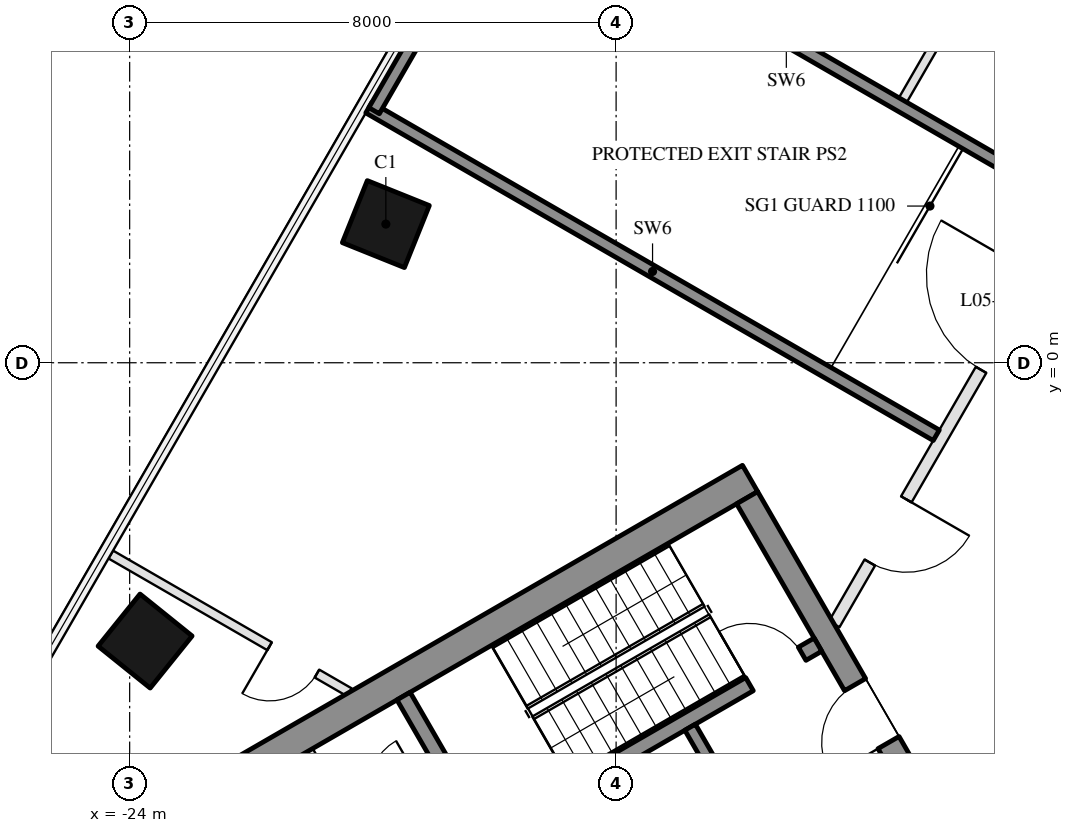
"""IFC4 building model, lengths in metres.
Left out: names, types, materials, properties, quantities, classifications, styles, units other than length and angle.
Written with IfcOpenShell. Run it as: python <this file> out.ifc"""

import sys

from ifc_helpers import new_model, si_unit, direction, frame, frame_2d, origin, origin_2d, place, context, subcontext, project, spatial, rectangle, hollow_rectangle, extrude, boolean, halfspace, element, fill, save


model = new_model("IFC4")
c1 = context("Model", 3, precision=1e-05, world=origin(), true_north=direction((0.0, 1.0)))
c2 = subcontext(c1, "Body", "Model", "MODEL_VIEW")
j1 = project(units=[si_unit("LENGTHUNIT", "METRE"), si_unit("PLANEANGLEUNIT", "RADIAN")], contexts=[c1])
p1 = place(None, origin())
s1 = spatial("IfcSite", under=j1, at=p1, CompositionType="ELEMENT")
p2 = place(p1, origin())
s2 = spatial("IfcBuilding", under=s1, at=p2, CompositionType="ELEMENT")
p3 = place(p2, frame((0.0, 0.0, 33.0)))
s3 = spatial("IfcBuildingStorey", under=s2, at=p3, CompositionType="ELEMENT", Elevation=33.0)
p4 = place(p3, frame((-19.787, 2.281, 0.0), z_axis=(0.010958529764, -0.001573254273, 0.99993871587), x_axis=(-0.501077464826, -0.865392580649, 0.004129842831)))
e1 = element("IfcColumn", 1, at=p4, inside=s3, PredefinedType="COLUMN", context=c2, shape_type="SweptSolid", body=[
    boolean("DIFFERENCE", boolean("DIFFERENCE", extrude(hollow_rectangle(XDim=1.1, YDim=1.1, WallThickness=0.05, at=origin_2d()), origin(), (0.0, 0.0, 1.0), 4.5), halfspace(frame((0.0, 0.0, 0.01), z_axis=(0.0, 0.0, 1.0), x_axis=(1.0, 0.0, 0.0)), True)), halfspace(frame((0.0, 0.0, 4.494), z_axis=(0.0, 0.0, 1.0), x_axis=(1.0, 0.0, 0.0)), False)),
])
p5 = place(p3, frame((-23.746, -4.577, 0.0), z_axis=(0.01301970202, 0.00206145282, 0.999913115111), x_axis=(-0.497599356322, -0.867367587298, 0.008267351011)))
e2 = element("IfcColumn", 2, at=p5, inside=s3, PredefinedType="COLUMN", context=c2, shape_type="SweptSolid", body=[
    boolean("DIFFERENCE", boolean("DIFFERENCE", extrude(hollow_rectangle(XDim=1.1, YDim=1.1, WallThickness=0.05, at=origin_2d()), origin(), (0.0, 0.0, 1.0), 4.5), halfspace(frame((0.0, 0.0, 0.012), z_axis=(0.0, 0.0, 1.0), x_axis=(1.0, 0.0, 0.0)), True)), halfspace(frame((0.0, 0.0, 4.493), z_axis=(0.0, 0.0, 1.0), x_axis=(1.0, 0.0, 0.0)), False)),
])
p6 = place(p3, frame((-13.797, -1.903, 0.0), z_axis=(0.0, 0.0, 1.0), x_axis=(-0.866025798973, -0.499999315512, 0.0)))
e3 = element("IfcWall", 3, at=p6, inside=s3, PredefinedType="SHEAR", context=c2, shape_type="SweptSolid", body=[
    extrude(rectangle(XDim=14.91, YDim=0.5, at=frame_2d((7.455, 0.0))), origin(), (0.0, 0.0, 1.0), 4.2),
])
p7 = place(p3, frame((-13.845, -2.22, 0.0), z_axis=(0.0, 0.0, 1.0), x_axis=(0.500004234368, -0.866022959057, 0.0)))
e4 = element("IfcWall", 4, at=p7, inside=s3, PredefinedType="SHEAR", context=c2, shape_type="SweptSolid", body=[
    extrude(rectangle(XDim=10.0, YDim=0.4, at=frame_2d((5.0, 0.0))), origin(), (0.0, 0.0, 1.0), 4.2),
])
p8 = place(p7, frame((3.55, 0.0, 0.0)))
e5 = element("IfcOpeningElement", 5, at=p8, cuts=e4, PredefinedType="OPENING", context=c2, shape_type="SweptSolid", body=[
    extrude(rectangle(XDim=1.1, YDim=2.1, at=frame_2d((0.55, 1.05))), frame((0.0, 0.21, 0.0), z_axis=(0.0, -1.0, 0.0), x_axis=(1.0, 0.0, 0.0)), (0.0, 0.0, 1.0), 0.42),
])
p9 = place(p7, frame((5.85, 0.0, 0.0)))
e6 = element("IfcOpeningElement", 6, at=p9, cuts=e4, PredefinedType="OPENING", context=c2, shape_type="SweptSolid", body=[
    extrude(rectangle(XDim=1.4, YDim=2.1, at=frame_2d((0.7, 1.05))), frame((0.0, 0.21, 0.0), z_axis=(0.0, -1.0, 0.0), x_axis=(1.0, 0.0, 0.0)), (0.0, 0.0, 1.0), 0.42),
])
p10 = place(p3, frame((-12.681, -4.636, 0.0), z_axis=(0.0, 0.0, 1.0), x_axis=(-0.866021702275, -0.500006411147, 0.0)))
e7 = element("IfcWall", 7, at=p10, inside=s3, PredefinedType="SHEAR", context=c2, shape_type="SweptSolid", body=[
    extrude(rectangle(XDim=6.45, YDim=0.25, at=frame_2d((3.225, 0.0))), origin(), (0.0, 0.0, 1.0), 4.2),
])
p11 = place(p10, frame((0.3, 0.0, 0.0)))
e8 = element("IfcOpeningElement", 8, at=p11, cuts=e7, PredefinedType="OPENING", context=c2, shape_type="SweptSolid", body=[
    extrude(rectangle(XDim=1.0, YDim=2.1, at=frame_2d((0.5, 1.05))), frame((0.0, 0.135, 0.0), z_axis=(0.0, -1.0, 0.0), x_axis=(1.0, 0.0, 0.0)), (0.0, 0.0, 1.0), 0.27),
])
p12 = place(p3, frame((-19.496, -5.482, 0.0), z_axis=(0.0, 0.0, 1.0), x_axis=(0.499990435942, -0.866030925526, 0.0)))
e9 = element("IfcWall", 9, at=p12, inside=s3, PredefinedType="SHEAR", context=c2, shape_type="SweptSolid", body=[
    extrude(rectangle(XDim=2.55, YDim=0.25, at=frame_2d((1.275, 0.0))), origin(), (0.0, 0.0, 1.0), 4.2),
])
p13 = place(p3, frame((-14.783, -5.995, 0.0), z_axis=(0.0, 0.0, 1.0), x_axis=(0.49994636267, -0.866056369097, 0.0)))
e10 = element("IfcWall", 10, at=p13, inside=s3, PredefinedType="SHEAR", context=c2, shape_type="SweptSolid", body=[
    extrude(rectangle(XDim=2.8, YDim=0.2, at=frame_2d((1.4, 0.0))), origin(), (0.0, 0.0, 1.0), 4.2),
])
p14 = place(p13, frame((0.7, 0.0, 0.0)))
e11 = element("IfcOpeningElement", 11, at=p14, cuts=e10, PredefinedType="OPENING", context=c2, shape_type="SweptSolid", body=[
    extrude(rectangle(XDim=1.2, YDim=2.1, at=frame_2d((0.6, 1.05))), frame((0.0, 0.11, 0.0), z_axis=(0.0, -1.0, 0.0), x_axis=(1.0, 0.0, 0.0)), (0.0, 0.0, 1.0), 0.22),
])
p15 = place(p3, frame((-21.076, -6.395, 0.0), z_axis=(0.0, 0.0, 1.0), x_axis=(0.50001468107, -0.866016927499, 0.0)))
e12 = element("IfcWall", 12, at=p15, inside=s3, PredefinedType="PARTITIONING", context=c2, shape_type="SweptSolid", body=[
    extrude(rectangle(XDim=5.4, YDim=0.2, at=frame_2d((2.7, 0.0))), origin(), (0.0, 0.0, 1.0), 4.2),
])
p16 = place(p15, frame((3.05, 0.0, 0.0)))
e13 = element("IfcOpeningElement", 13, at=p16, cuts=e12, PredefinedType="OPENING", context=c2, shape_type="SweptSolid", body=[
    extrude(rectangle(XDim=0.9, YDim=2.1, at=frame_2d((0.45, 1.05))), frame((0.0, 0.11, 0.0), z_axis=(0.0, -1.0, 0.0), x_axis=(1.0, 0.0, 0.0)), (0.0, 0.0, 1.0), 0.22),
])
p17 = place(p3, frame((-7.122, 11.531, 0.0), z_axis=(0.0, 0.0, 1.0), x_axis=(-0.500018619731, -0.866014653411, 0.0)))
e14 = element("IfcWall", 14, at=p17, inside=s3, PredefinedType="PARTITIONING", context=c2, shape_type="SweptSolid", body=[
    extrude(rectangle(XDim=8.325, YDim=0.15, at=frame_2d((4.163, 0.0))), origin(), (0.0, 0.0, 1.0), 3.41),
])
p18 = place(p17, frame((6.354, 0.0, 0.0)))
e15 = element("IfcOpeningElement", 15, at=p18, cuts=e14, PredefinedType="OPENING", context=c2, shape_type="SweptSolid", body=[
    extrude(rectangle(XDim=1.0, YDim=2.1, at=frame_2d((0.5, 1.05))), frame((0.0, 0.085, 0.0), z_axis=(0.0, -1.0, 0.0), x_axis=(1.0, 0.0, 0.0)), (0.0, 0.0, 1.0), 0.17),
])
p19 = place(p17, frame((3.562, 0.0, 0.0)))
e16 = element("IfcOpeningElement", 16, at=p19, cuts=e14, PredefinedType="OPENING", context=c2, shape_type="SweptSolid", body=[
    extrude(rectangle(XDim=0.9, YDim=2.1, at=frame_2d((0.45, 1.05))), frame((0.0, 0.085, 0.0), z_axis=(0.0, -1.0, 0.0), x_axis=(1.0, 0.0, 0.0)), (0.0, 0.0, 1.0), 0.17),
])
p20 = place(p17, frame((0.871, 0.0, 0.0)))
e17 = element("IfcOpeningElement", 17, at=p20, cuts=e14, PredefinedType="OPENING", context=c2, shape_type="SweptSolid", body=[
    extrude(rectangle(XDim=0.9, YDim=2.1, at=frame_2d((0.45, 1.05))), frame((0.0, 0.085, 0.0), z_axis=(0.0, -1.0, 0.0), x_axis=(1.0, 0.0, 0.0)), (0.0, 0.0, 1.0), 0.17),
])
p21 = place(p3, frame((-17.867, 8.006, 0.0), z_axis=(0.0, 0.0, 1.0), x_axis=(0.866017693218, -0.500013354855, 0.0)))
e18 = element("IfcWall", 18, at=p21, inside=s3, PredefinedType="SOLIDWALL", context=c2, shape_type="SweptSolid", body=[
    extrude(rectangle(XDim=10.776, YDim=0.2, at=frame_2d((5.388, 0.0))), origin(), (0.0, 0.0, 1.0), 4.2),
])
p22 = place(p3, frame((-20.067, 4.196, 0.0), z_axis=(0.0, 0.0, 1.0), x_axis=(0.866023357302, -0.500003544594, 0.0)))
e19 = element("IfcWall", 19, at=p22, inside=s3, PredefinedType="SOLIDWALL", context=c2, shape_type="SweptSolid", body=[
    extrude(rectangle(XDim=10.776, YDim=0.2, at=frame_2d((5.388, 0.0))), origin(), (0.0, 0.0, 1.0), 4.2),
])
p23 = place(p3, frame((-24.31, -3.155, 0.0), z_axis=(0.0, 0.0, 1.0), x_axis=(0.866025843094, -0.499999239093, 0.0)))
e20 = element("IfcWall", 20, at=p23, inside=s3, PredefinedType="PARTITIONING", context=c2, shape_type="SweptSolid", body=[
    extrude(rectangle(XDim=4.53, YDim=0.15, at=frame_2d((2.265, 0.0))), origin(), (0.0, 0.0, 1.0), 4.2),
])
p24 = place(p23, frame((3.015, 0.0, 0.0)))
e21 = element("IfcOpeningElement", 21, at=p24, cuts=e20, PredefinedType="OPENING", context=c2, shape_type="SweptSolid", body=[
    extrude(rectangle(XDim=0.9, YDim=2.1, at=frame_2d((0.45, 1.05))), frame((0.0, 0.085, 0.0), z_axis=(0.0, -1.0, 0.0), x_axis=(1.0, 0.0, 0.0)), (0.0, 0.0, 1.0), 0.17),
])
p25 = place(p3, frame((-2.482, 12.9, 0.0), z_axis=(0.0, 0.0, 1.0), x_axis=(-0.50000478328, -0.866022642139, 0.0)))
e22 = element("IfcWall", 22, at=p25, inside=s3, PredefinedType="PARTITIONING", context=c2, shape_type="SweptSolid", body=[
    extrude(rectangle(XDim=19.861, YDim=0.2, at=frame_2d((9.931, 0.0))), origin(), (0.0, 0.0, 1.0), 3.41),
])
p26 = place(p25, frame((13.23, 0.0, 0.0)))
e23 = element("IfcOpeningElement", 23, at=p26, cuts=e22, PredefinedType="OPENING", context=c2, shape_type="SweptSolid", body=[
    extrude(rectangle(XDim=1.8, YDim=2.1, at=frame_2d((0.9, 1.05))), frame((0.0, 0.11, 0.0), z_axis=(0.0, -1.0, 0.0), x_axis=(1.0, 0.0, 0.0)), (0.0, 0.0, 1.0), 0.22),
])
p27 = place(p25, frame((0.667, 0.0, 0.0)))
e24 = element("IfcOpeningElement", 24, at=p27, cuts=e22, PredefinedType="OPENING", context=c2, shape_type="SweptSolid", body=[
    extrude(rectangle(XDim=1.0, YDim=2.1, at=frame_2d((0.5, 1.05))), frame((0.0, 0.11, 0.0), z_axis=(0.0, -1.0, 0.0), x_axis=(1.0, 0.0, 0.0)), (0.0, 0.0, 1.0), 0.22),
])
p28 = place(p25, frame((2.1, 0.0, 0.0)))
e25 = element("IfcOpeningElement", 25, at=p28, cuts=e22, PredefinedType="OPENING", context=c2, shape_type="SweptSolid", body=[
    extrude(rectangle(XDim=1.0, YDim=2.1, at=frame_2d((0.5, 1.05))), frame((0.0, 0.11, 0.0), z_axis=(0.0, -1.0, 0.0), x_axis=(1.0, 0.0, 0.0)), (0.0, 0.0, 1.0), 0.22),
])
p29 = place(p25, frame((17.49, 0.0, 0.0)))
e26 = element("IfcOpeningElement", 26, at=p29, cuts=e22, PredefinedType="OPENING", context=c2, shape_type="SweptSolid", body=[
    extrude(rectangle(XDim=1.2, YDim=2.1, at=frame_2d((0.6, 1.05))), frame((0.0, 0.11, 0.0), z_axis=(0.0, -1.0, 0.0), x_axis=(1.0, 0.0, 0.0)), (0.0, 0.0, 1.0), 0.22),
])
p30 = place(p25, frame((7.168, 0.0, 0.0)))
e27 = element("IfcOpeningElement", 27, at=p30, cuts=e22, PredefinedType="OPENING", context=c2, shape_type="SweptSolid", body=[
    extrude(rectangle(XDim=1.0, YDim=2.1, at=frame_2d((0.5, 1.05))), frame((0.0, 0.11, 0.0), z_axis=(0.0, -1.0, 0.0), x_axis=(1.0, 0.0, 0.0)), (0.0, 0.0, 1.0), 0.22),
])
p31 = place(p3, frame((-17.78, 7.956, 0.0), z_axis=(0.0, 0.0, 1.0), x_axis=(-0.499988222896, -0.866032203192, 0.0)))
e28 = element("IfcWall", 28, at=p31, inside=s3, PredefinedType="SOLIDWALL", context=c2, shape_type="SweptSolid", body=[
    extrude(rectangle(XDim=4.4, YDim=0.2, at=frame_2d((2.2, 0.0))), origin(), (0.0, 0.0, 1.0), 4.2),
])
p32 = place(p8, frame((1.1, 0.0, 0.0), z_axis=(0.0, 0.0, 1.0), x_axis=(-1.0, 0.0, 0.0)))
e29 = element("IfcDoor", 29, at=p32, inside=s3, OperationType="SINGLE_SWING_LEFT", PredefinedType="DOOR", context=c2, shape_type="SweptSolid", body=[
    extrude(rectangle(XDim=1.1, YDim=2.1, at=frame_2d((0.55, 1.05))), frame((0.0, 0.025, 0.0), z_axis=(0.0, -1.0, 0.0), x_axis=(1.0, 0.0, 0.0)), (0.0, 0.0, 1.0), 0.05),
])
fill(e5, e29)
p33 = place(p11, frame((1.0, 0.0, 0.0), z_axis=(0.0, 0.0, 1.0), x_axis=(-1.0, 0.0, 0.0)))
e30 = element("IfcDoor", 30, at=p33, inside=s3, OperationType="SINGLE_SWING_LEFT", PredefinedType="DOOR", context=c2, shape_type="SweptSolid", body=[
    extrude(rectangle(XDim=1.0, YDim=2.1, at=frame_2d((0.5, 1.05))), frame((0.0, 0.025, 0.0), z_axis=(0.0, -1.0, 0.0), x_axis=(1.0, 0.0, 0.0)), (0.0, 0.0, 1.0), 0.05),
])
fill(e8, e30)
p34 = place(p26, frame((1.8, 0.0, 0.0), z_axis=(0.0, 0.0, 1.0), x_axis=(-1.0, 0.0, 0.0)))
e31 = element("IfcDoor", 31, at=p34, inside=s3, OperationType="DOUBLE_DOOR_SINGLE_SWING", PredefinedType="DOOR", context=c2, shape_type="SweptSolid", body=[
    extrude(rectangle(XDim=1.8, YDim=2.1, at=frame_2d((0.9, 1.05))), frame((0.0, 0.025, 0.0), z_axis=(0.0, -1.0, 0.0), x_axis=(1.0, 0.0, 0.0)), (0.0, 0.0, 1.0), 0.05),
])
fill(e23, e31)
p35 = place(p29, origin())
e32 = element("IfcDoor", 32, at=p35, inside=s3, OperationType="SINGLE_SWING_LEFT", PredefinedType="DOOR", context=c2, shape_type="SweptSolid", body=[
    extrude(rectangle(XDim=1.2, YDim=2.1, at=frame_2d((0.6, 1.05))), frame((0.0, 0.025, 0.0), z_axis=(0.0, -1.0, 0.0), x_axis=(1.0, 0.0, 0.0)), (0.0, 0.0, 1.0), 0.05),
])
fill(e26, e32)
p36 = place(p24, frame((0.9, 0.0, 0.0), z_axis=(0.0, 0.0, 1.0), x_axis=(-1.0, 0.0, 0.0)))
e33 = element("IfcDoor", 33, at=p36, inside=s3, OperationType="SINGLE_SWING_RIGHT", PredefinedType="DOOR", context=c2, shape_type="SweptSolid", body=[
    extrude(rectangle(XDim=0.9, YDim=2.1, at=frame_2d((0.45, 1.05))), frame((0.0, 0.025, 0.0), z_axis=(0.0, -1.0, 0.0), x_axis=(1.0, 0.0, 0.0)), (0.0, 0.0, 1.0), 0.05),
])
fill(e21, e33)
save(model, sys.argv[1])
